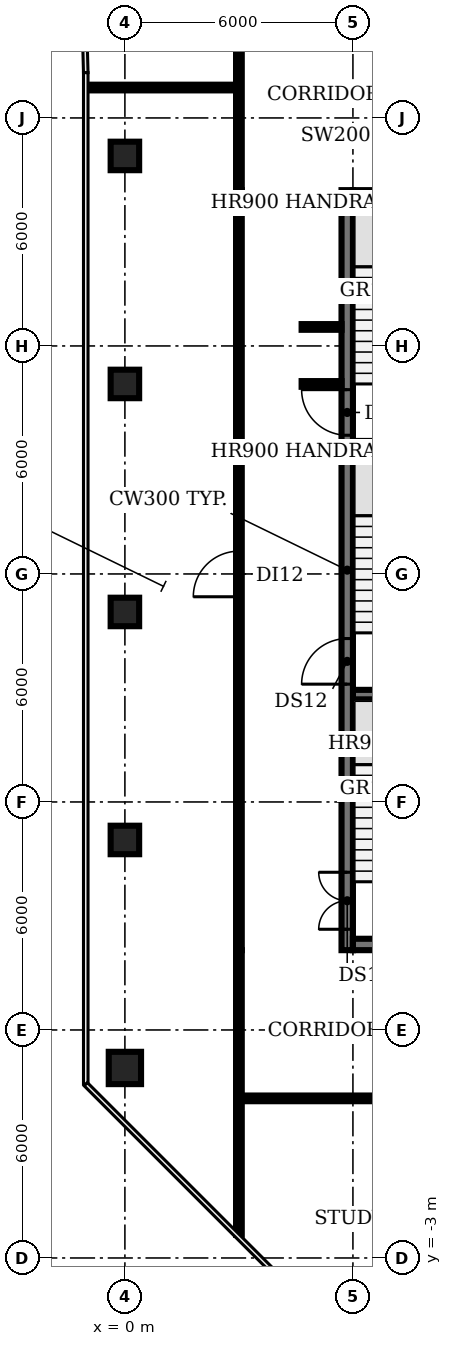
"""IFC4 building model, lengths in metres.
Left out: names, types, materials, properties, quantities, classifications, styles, units other than length and angle.
Written with IfcOpenShell. Run it as: python <this file> out.ifc"""

import sys

from ifc_helpers import new_model, si_unit, direction, frame, frame_2d, origin, origin_2d, place, context, subcontext, project, spatial, rectangle, circle, extrude, element, fill, save


model = new_model("IFC4")
c1 = context("Model", 3, precision=1e-05, world=origin(), true_north=direction((0.0, 1.0)))
c2 = subcontext(c1, "Body", "Model", "MODEL_VIEW")
j1 = project(units=[si_unit("LENGTHUNIT", "METRE"), si_unit("PLANEANGLEUNIT", "RADIAN")], contexts=[c1])
p1 = place(None, origin())
s1 = spatial("IfcSite", under=j1, at=p1, CompositionType="ELEMENT")
p2 = place(p1, origin())
s2 = spatial("IfcBuilding", under=s1, at=p2, CompositionType="ELEMENT")
p3 = place(p2, frame((0.0, 0.0, 293.6)))
s3 = spatial("IfcBuildingStorey", under=s2, at=p3, CompositionType="ELEMENT", Elevation=293.6)
p4 = place(p3, frame((0.0, 2.0, 0.0), z_axis=(0.0, 0.0, 1.0), x_axis=(1.0, 0.0, 0.0)))
e1 = element("IfcColumn", 1, at=p4, inside=s3, PredefinedType="COLUMN", context=c2, shape_type="SweptSolid", body=[
    extrude(circle(Radius=0.425, at=origin_2d()), origin(), (0.0, 0.0, 1.0), 3.85),
])
for number, where, z_axis, x_axis in (
    (2, (0.0, 8.0, 0.0), (0.0, 0.0, 1.0), (1.0, 0.0, 0.0)),
    (3, (0.0, 14.0, 0.0), (0.0, 0.0, 1.0), (1.0, 0.0, 0.0)),
    (4, (0.0, 20.0, 0.0), (0.0, 0.0, 1.0), (1.0, 0.0, 0.0)),
    (5, (0.0, 26.0, 0.0), (0.0, 0.0, 1.0), (1.0, 0.0, 0.0)),
):
    element("IfcColumn", number, at=place(p3, frame(where, z_axis=z_axis, x_axis=x_axis)), inside=s3, PredefinedType="COLUMN", context=c2, shape_type="SweptSolid", body=[
        extrude(rectangle(XDim=0.75, YDim=0.75, at=origin_2d()), origin(), (0.0, 0.0, 1.0), 3.85),
    ])
for number, where, z_axis, x_axis in (
    (6, (6.0, 11.825, 0.0), (0.0, 0.0, 1.0), (1.0, 0.0, 0.0)),
    (7, (6.0, 18.375, 0.0), (0.0, 0.0, 1.0), (1.0, 0.0, 0.0)),
):
    element("IfcWall", number, at=place(p3, frame(where, z_axis=z_axis, x_axis=x_axis)), inside=s3, PredefinedType="SHEAR", context=c2, shape_type="SweptSolid", body=[
        extrude(rectangle(XDim=3.15, YDim=0.25, at=frame_2d((1.575, 0.0))), origin(), (0.0, 0.0, 1.0), 3.85),
    ])
p5 = place(p3, frame((5.85, 5.1, 0.0), z_axis=(0.0, 0.0, 1.0), x_axis=(0.0, 1.0, 0.0)))
e8 = element("IfcWall", 8, at=p5, inside=s3, PredefinedType="SHEAR", context=c2, shape_type="SweptSolid", body=[
    extrude(rectangle(XDim=20.0, YDim=0.3, at=frame_2d((10.0, 0.0))), origin(), (0.0, 0.0, 1.0), 3.85),
])
p6 = place(p5, frame((0.55, 0.0, 0.0)))
e9 = element("IfcOpeningElement", 9, at=p6, cuts=e8, PredefinedType="OPENING", context=c2, shape_type="SweptSolid", body=[
    extrude(rectangle(XDim=1.5, YDim=2.1, at=frame_2d((0.75, 1.05))), frame((0.0, 0.16, 0.0), z_axis=(0.0, -1.0, 0.0), x_axis=(1.0, 0.0, 0.0)), (0.0, 0.0, 1.0), 0.32),
])
p7 = place(p5, frame((7.0, 0.0, 0.0)))
e10 = element("IfcOpeningElement", 10, at=p7, cuts=e8, PredefinedType="OPENING", context=c2, shape_type="SweptSolid", body=[
    extrude(rectangle(XDim=1.2, YDim=2.1, at=frame_2d((0.6, 1.05))), frame((0.0, 0.16, 0.0), z_axis=(0.0, -1.0, 0.0), x_axis=(1.0, 0.0, 0.0)), (0.0, 0.0, 1.0), 0.32),
])
p8 = place(p5, frame((13.55, 0.0, 0.0)))
e11 = element("IfcOpeningElement", 11, at=p8, cuts=e8, PredefinedType="OPENING", context=c2, shape_type="SweptSolid", body=[
    extrude(rectangle(XDim=1.2, YDim=2.1, at=frame_2d((0.6, 1.05))), frame((0.0, 0.16, 0.0), z_axis=(0.0, -1.0, 0.0), x_axis=(1.0, 0.0, 0.0)), (0.0, 0.0, 1.0), 0.32),
])
p9 = place(p3, frame((24.0, 5.25, 0.0), z_axis=(0.0, 0.0, 1.0), x_axis=(-1.0, 0.0, 0.0)))
e12 = element("IfcWall", 12, at=p9, inside=s3, PredefinedType="SHEAR", context=c2, shape_type="SweptSolid", body=[
    extrude(rectangle(XDim=18.0, YDim=0.3, at=frame_2d((9.0, 0.0))), origin(), (0.0, 0.0, 1.0), 3.85),
])
p10 = place(p9, frame((13.0, 0.0, 0.0)))
e13 = element("IfcOpeningElement", 13, at=p10, cuts=e12, PredefinedType="OPENING", context=c2, shape_type="SweptSolid", body=[
    extrude(rectangle(XDim=1.2, YDim=2.1, at=frame_2d((0.6, 1.05))), frame((0.0, 0.16, 0.0), z_axis=(0.0, -1.0, 0.0), x_axis=(1.0, 0.0, 0.0)), (0.0, 0.0, 1.0), 0.32),
])
p11 = place(p9, frame((4.9, 0.0, 0.0)))
e14 = element("IfcOpeningElement", 14, at=p11, cuts=e12, PredefinedType="OPENING", context=c2, shape_type="SweptSolid", body=[
    extrude(rectangle(XDim=1.0, YDim=2.1, at=frame_2d((0.5, 1.05))), frame((0.0, 0.16, 0.0), z_axis=(0.0, -1.0, 0.0), x_axis=(1.0, 0.0, 0.0)), (0.0, 0.0, 1.0), 0.32),
])
p12 = place(p3, frame((6.0, 24.95, 0.0), z_axis=(0.0, 0.0, 1.0), x_axis=(1.0, 0.0, 0.0)))
e15 = element("IfcWall", 15, at=p12, inside=s3, PredefinedType="SHEAR", context=c2, shape_type="SweptSolid", body=[
    extrude(rectangle(XDim=18.0, YDim=0.3, at=frame_2d((9.0, 0.0))), origin(), (0.0, 0.0, 1.0), 3.85),
])
p13 = place(p3, frame((-0.98, 27.8, 0.0), z_axis=(0.0, 0.0, 1.0), x_axis=(1.0, 0.0, 0.0)))
e16 = element("IfcWall", 16, at=p13, inside=s3, PredefinedType="PARTITIONING", context=c2, shape_type="SweptSolid", body=[
    extrude(rectangle(XDim=3.98, YDim=0.15, at=frame_2d((1.99, 0.0))), origin(), (0.0, 0.0, 1.0), 2.9),
])
p14 = place(p3, frame((3.0, -2.39, 0.0), z_axis=(0.0, 0.0, 1.0), x_axis=(0.0, 1.0, 0.0)))
e17 = element("IfcWall", 17, at=p14, inside=s3, PredefinedType="PARTITIONING", context=c2, shape_type="SweptSolid", body=[
    extrude(rectangle(XDim=3.59, YDim=0.15, at=frame_2d((1.795, 0.0))), origin(), (0.0, 0.0, 1.0), 2.9),
])
p15 = place(p3, frame((3.0, 1.2, 0.0), z_axis=(0.0, 0.0, 1.0), x_axis=(0.0, 1.0, 0.0)))
e18 = element("IfcWall", 18, at=p15, inside=s3, PredefinedType="PARTITIONING", context=c2, shape_type="SweptSolid", body=[
    extrude(rectangle(XDim=3.9, YDim=0.15, at=frame_2d((1.95, 0.0))), origin(), (0.0, 0.0, 1.0), 2.9),
])
p16 = place(p3, frame((3.0, 5.1, 0.0), z_axis=(0.0, 0.0, 1.0), x_axis=(0.0, 1.0, 0.0)))
e19 = element("IfcWall", 19, at=p16, inside=s3, PredefinedType="PARTITIONING", context=c2, shape_type="SweptSolid", body=[
    extrude(rectangle(XDim=20.0, YDim=0.15, at=frame_2d((10.0, 0.0))), origin(), (0.0, 0.0, 1.0), 2.9),
])
p17 = place(p16, frame((9.3, 0.0, 0.0)))
e20 = element("IfcOpeningElement", 20, at=p17, cuts=e19, PredefinedType="OPENING", context=c2, shape_type="SweptSolid", body=[
    extrude(rectangle(XDim=1.2, YDim=2.1, at=frame_2d((0.6, 1.05))), frame((0.0, 0.085, 0.0), z_axis=(0.0, -1.0, 0.0), x_axis=(1.0, 0.0, 0.0)), (0.0, 0.0, 1.0), 0.17),
])
p18 = place(p3, frame((3.0, 25.1, 0.0), z_axis=(0.0, 0.0, 1.0), x_axis=(0.0, 1.0, 0.0)))
e21 = element("IfcWall", 21, at=p18, inside=s3, PredefinedType="PARTITIONING", context=c2, shape_type="SweptSolid", body=[
    extrude(rectangle(XDim=3.9, YDim=0.15, at=frame_2d((1.95, 0.0))), origin(), (0.0, 0.0, 1.0), 2.9),
])
for number, where, z_axis, x_axis in (
    (22, (4.65, 20.0, 0.0), (0.0, 0.0, 1.0), (1.0, 0.0, 0.0)),
    (23, (4.65, 21.5, 0.0), (0.0, 0.0, 1.0), (1.0, 0.0, 0.0)),
):
    element("IfcWall", number, at=place(p3, frame(where, z_axis=z_axis, x_axis=x_axis)), inside=s3, PredefinedType="PARTITIONING", context=c2, shape_type="SweptSolid", body=[
        extrude(rectangle(XDim=1.05, YDim=0.15, at=frame_2d((0.525, 0.0))), origin(), (0.0, 0.0, 1.0), 2.9),
    ])
p19 = place(p3, frame((27.0, 1.2, 0.0), z_axis=(0.0, 0.0, 1.0), x_axis=(-1.0, 0.0, 0.0)))
e24 = element("IfcWall", 24, at=p19, inside=s3, PredefinedType="PARTITIONING", context=c2, shape_type="SweptSolid", body=[
    extrude(rectangle(XDim=24.0, YDim=0.15, at=frame_2d((12.0, 0.0))), origin(), (0.0, 0.0, 1.0), 2.9),
])
p20 = place(p19, frame((11.5, 0.0, 0.0)))
e25 = element("IfcOpeningElement", 25, at=p20, cuts=e24, PredefinedType="OPENING", context=c2, shape_type="SweptSolid", body=[
    extrude(rectangle(XDim=1.2, YDim=2.1, at=frame_2d((0.6, 1.05))), frame((0.0, 0.085, 0.0), z_axis=(0.0, -1.0, 0.0), x_axis=(1.0, 0.0, 0.0)), (0.0, 0.0, 1.0), 0.17),
])
p21 = place(p6, origin())
e26 = element("IfcDoor", 26, at=p21, inside=s3, OperationType="DOUBLE_DOOR_SINGLE_SWING", PredefinedType="DOOR", context=c2, shape_type="SweptSolid", body=[
    extrude(rectangle(XDim=1.5, YDim=2.1, at=frame_2d((0.75, 1.05))), frame((0.0, 0.025, 0.0), z_axis=(0.0, -1.0, 0.0), x_axis=(1.0, 0.0, 0.0)), (0.0, 0.0, 1.0), 0.05),
])
fill(e9, e26)
p22 = place(p7, origin())
e27 = element("IfcDoor", 27, at=p22, inside=s3, OperationType="SINGLE_SWING_LEFT", PredefinedType="DOOR", context=c2, shape_type="SweptSolid", body=[
    extrude(rectangle(XDim=1.2, YDim=2.1, at=frame_2d((0.6, 1.05))), frame((0.0, 0.025, 0.0), z_axis=(0.0, -1.0, 0.0), x_axis=(1.0, 0.0, 0.0)), (0.0, 0.0, 1.0), 0.05),
])
fill(e10, e27)
p23 = place(p8, origin())
e28 = element("IfcDoor", 28, at=p23, inside=s3, OperationType="SINGLE_SWING_RIGHT", PredefinedType="DOOR", context=c2, shape_type="SweptSolid", body=[
    extrude(rectangle(XDim=1.2, YDim=2.1, at=frame_2d((0.6, 1.05))), frame((0.0, 0.025, 0.0), z_axis=(0.0, -1.0, 0.0), x_axis=(1.0, 0.0, 0.0)), (0.0, 0.0, 1.0), 0.05),
])
fill(e11, e28)
p24 = place(p17, origin())
e29 = element("IfcDoor", 29, at=p24, inside=s3, OperationType="SINGLE_SWING_LEFT", PredefinedType="DOOR", context=c2, shape_type="SweptSolid", body=[
    extrude(rectangle(XDim=1.2, YDim=2.1, at=frame_2d((0.6, 1.05))), frame((0.0, 0.025, 0.0), z_axis=(0.0, -1.0, 0.0), x_axis=(1.0, 0.0, 0.0)), (0.0, 0.0, 1.0), 0.05),
])
fill(e20, e29)
save(model, sys.argv[1])
